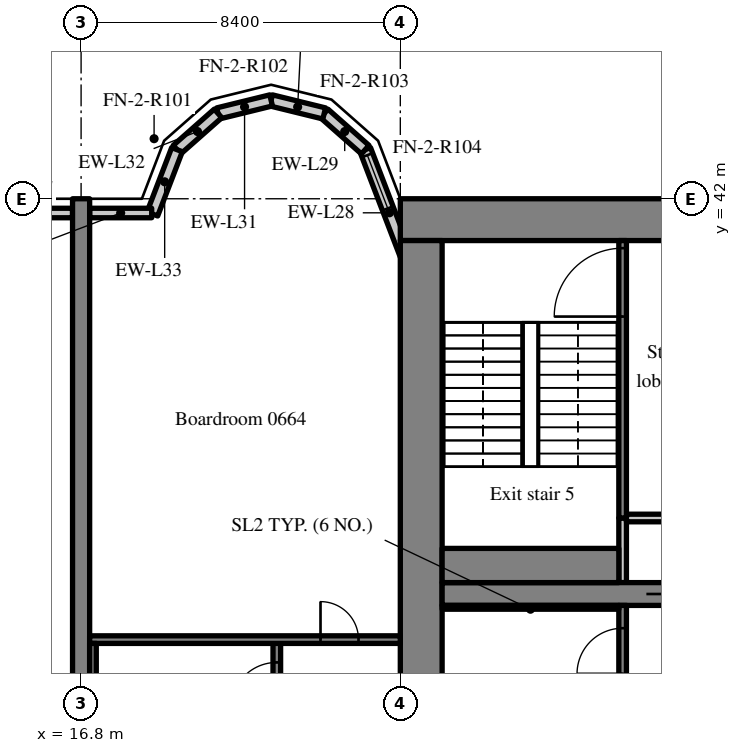
"""IFC4 building model, lengths in metres.
Left out: names, types, materials, properties, quantities, classifications, styles, units other than length and angle.
Written with IfcOpenShell. Run it as: python <this file> out.ifc"""

import sys

from ifc_helpers import new_model, si_unit, direction, frame, frame_2d, origin, place, context, subcontext, project, spatial, rectangle, extrude, source, transform, mapped, element, fill, save


model = new_model("IFC4")
c1 = context("Model", 3, precision=1e-05, world=origin(), true_north=direction((0.0, 1.0)))
c2 = subcontext(c1, "Body", "Model", "MODEL_VIEW")
j1 = project(units=[si_unit("LENGTHUNIT", "METRE"), si_unit("PLANEANGLEUNIT", "RADIAN")], contexts=[c1])
p1 = place(None, origin())
s1 = spatial("IfcSite", under=j1, at=p1, CompositionType="ELEMENT")
p2 = place(p1, origin())
s2 = spatial("IfcBuilding", under=s1, at=p2, CompositionType="ELEMENT")
p3 = place(p2, frame((0.0, 0.0, 31.6)))
s3 = spatial("IfcBuildingStorey", under=s2, at=p3, CompositionType="ELEMENT", Elevation=31.6)
m1 = source(origin(), c2, "Body", "SweptSolid", [
    extrude(rectangle(XDim=50.4, YDim=1.1, at=frame_2d((25.2, 0.0))), origin(), (0.0, 0.0, 1.0), 3.52),
])
p4 = place(p3, frame((25.2, 41.45, 0.0), z_axis=(0.0, 0.0, 1.0), x_axis=(1.0, 0.0, 0.0)))
e1 = element("IfcWall", 1, at=p4, inside=s3, PredefinedType="SHEAR", context=c2, shape_type="MappedRepresentation", body=[
    mapped(m1, transform((0.0, 0.0, 0.0), scale=1.0)),
])
m2 = source(origin(), c2, "Body", "SweptSolid", [
    extrude(rectangle(XDim=17.8, YDim=1.1, at=frame_2d((8.9, 0.0))), origin(), (0.0, 0.0, 1.0), 3.52),
])
p5 = place(p3, frame((25.75, 23.1, 0.0), z_axis=(0.0, 0.0, 1.0), x_axis=(0.0, 1.0, 0.0)))
e2 = element("IfcWall", 2, at=p5, inside=s3, PredefinedType="SHEAR", context=c2, shape_type="MappedRepresentation", body=[
    mapped(m2, transform((0.0, 0.0, 0.0), scale=1.0)),
])
m3 = source(origin(), c2, "Body", "SweptSolid", [
    extrude(rectangle(XDim=7.0, YDim=0.6, at=frame_2d((3.5, 0.0))), origin(), (0.0, 0.0, 1.0), 3.52),
])
p6 = place(p3, frame((26.3, 31.6, 0.0), z_axis=(0.0, 0.0, 1.0), x_axis=(1.0, 0.0, 0.0)))
e3 = element("IfcWall", 3, at=p6, inside=s3, PredefinedType="SHEAR", context=c2, shape_type="MappedRepresentation", body=[
    mapped(m3, transform((0.0, 0.0, 0.0), scale=1.0)),
])
m4 = source(origin(), c2, "Body", "SweptSolid", [
    extrude(rectangle(XDim=1.1, YDim=2.1, at=frame_2d((0.55, 1.05))), frame((0.0, 0.31, 0.0), z_axis=(0.0, -1.0, 0.0), x_axis=(1.0, 0.0, 0.0)), (0.0, 0.0, 1.0), 0.62),
])
p7 = place(p6, frame((5.375, 0.0, 0.0)))
e4 = element("IfcOpeningElement", 4, at=p7, cuts=e3, PredefinedType="OPENING", context=c2, shape_type="MappedRepresentation", body=[
    mapped(m4, transform((0.0, 0.0, 0.0), scale=1.0)),
])
m5 = source(origin(), c2, "Body", "SweptSolid", [
    extrude(rectangle(XDim=20.0, YDim=0.45, at=frame_2d((10.0, 0.0))), origin(), (0.0, 0.0, 1.0), 3.52),
])
p8 = place(p3, frame((16.8, 22.0, 0.0), z_axis=(0.0, 0.0, 1.0), x_axis=(0.0, 1.0, 0.0)))
e5 = element("IfcWall", 5, at=p8, inside=s3, PredefinedType="SHEAR", context=c2, shape_type="MappedRepresentation", body=[
    mapped(m5, transform((0.0, 0.0, 0.0), scale=1.0)),
])
m6 = source(origin(), c2, "Body", "SweptSolid", [
    extrude(rectangle(XDim=3.559, YDim=0.3, at=frame_2d((1.78, 0.0))), origin(), (0.0, 0.0, 1.0), 3.52),
])
p9 = place(p3, frame((25.55, 39.969, 0.0), z_axis=(0.0, 0.0, 1.0), x_axis=(-0.35779745313, 0.933799219604, 0.0)))
e6 = element("IfcWall", 6, at=p9, inside=s3, PredefinedType="SOLIDWALL", context=c2, shape_type="MappedRepresentation", body=[
    mapped(m6, transform((0.0, 0.0, 0.0), scale=1.0)),
])
m7 = source(origin(), c2, "Body", "SweptSolid", [
    extrude(rectangle(XDim=1.5, YDim=2.0, at=frame_2d((0.75, 1.0))), frame((0.0, 0.16, 0.0), z_axis=(0.0, -1.0, 0.0), x_axis=(1.0, 0.0, 0.0)), (0.0, 0.0, 1.0), 0.32),
])
p10 = place(p9, frame((1.903, 0.0, 0.9)))
e7 = element("IfcOpeningElement", 7, at=p10, cuts=e6, PredefinedType="OPENING", context=c2, shape_type="MappedRepresentation", body=[
    mapped(m7, transform((0.0, 0.0, 0.0), scale=1.0)),
])
m8 = source(origin(), c2, "Body", "SweptSolid", [
    extrude(rectangle(XDim=1.44, YDim=0.3, at=frame_2d((0.72, 0.0))), origin(), (0.0, 0.0, 1.0), 3.52),
])
p11 = place(p3, frame((24.277, 43.292, 0.0), z_axis=(0.0, 0.0, 1.0), x_axis=(-0.749649827867, 0.661834673902, 0.0)))
e8 = element("IfcWall", 8, at=p11, inside=s3, PredefinedType="SOLIDWALL", context=c2, shape_type="MappedRepresentation", body=[
    mapped(m8, transform((0.0, 0.0, 0.0), scale=1.0)),
])
m9 = source(origin(), c2, "Body", "SweptSolid", [
    extrude(rectangle(XDim=1.438, YDim=0.3, at=frame_2d((0.719, 0.0))), origin(), (0.0, 0.0, 1.0), 3.52),
])
p12 = place(p3, frame((23.197, 44.245, 0.0), z_axis=(0.0, 0.0, 1.0), x_axis=(-0.971152283879, 0.238460146601, 0.0)))
e9 = element("IfcWall", 9, at=p12, inside=s3, PredefinedType="SOLIDWALL", context=c2, shape_type="MappedRepresentation", body=[
    mapped(m9, transform((0.0, 0.0, 0.0), scale=1.0)),
])
m10 = source(origin(), c2, "Body", "SweptSolid", [
    extrude(rectangle(XDim=1.439, YDim=0.3, at=frame_2d((0.719, 0.0))), origin(), (0.0, 0.0, 1.0), 3.52),
])
p13 = place(p3, frame((21.8, 44.588, 0.0), z_axis=(0.0, 0.0, 1.0), x_axis=(-0.971161932466, -0.238420848351, 0.0)))
e10 = element("IfcWall", 10, at=p13, inside=s3, PredefinedType="SOLIDWALL", context=c2, shape_type="MappedRepresentation", body=[
    mapped(m10, transform((0.0, 0.0, 0.0), scale=1.0)),
])
m11 = source(origin(), c2, "Body", "SweptSolid", [
    extrude(rectangle(XDim=1.44, YDim=0.3, at=frame_2d((0.72, 0.0))), origin(), (0.0, 0.0, 1.0), 3.52),
])
p14 = place(p3, frame((20.403, 44.245, 0.0), z_axis=(0.0, 0.0, 1.0), x_axis=(-0.74957555648, -0.661918790432, 0.0)))
e11 = element("IfcWall", 11, at=p14, inside=s3, PredefinedType="SOLIDWALL", context=c2, shape_type="MappedRepresentation", body=[
    mapped(m11, transform((0.0, 0.0, 0.0), scale=1.0)),
])
m12 = source(origin(), c2, "Body", "SweptSolid", [
    extrude(rectangle(XDim=1.812, YDim=0.3, at=frame_2d((0.906, 0.0))), origin(), (0.0, 0.0, 1.0), 3.52),
])
p15 = place(p3, frame((19.323, 43.292, 0.0), z_axis=(0.0, 0.0, 1.0), x_axis=(-0.357877270961, -0.93376863244, 0.0)))
e12 = element("IfcWall", 12, at=p15, inside=s3, PredefinedType="SOLIDWALL", context=c2, shape_type="MappedRepresentation", body=[
    mapped(m12, transform((0.0, 0.0, 0.0), scale=1.0)),
])
m13 = source(origin(), c2, "Body", "SweptSolid", [
    extrude(rectangle(XDim=3.525, YDim=0.25, at=frame_2d((1.762, 0.0))), origin(), (0.0, 0.0, 1.0), 2.77),
])
p16 = place(p3, frame((16.575, 41.625, 0.0), z_axis=(0.0, 0.0, 1.0), x_axis=(-1.0, 0.0, 0.0)))
e13 = element("IfcWall", 13, at=p16, inside=s3, PredefinedType="SOLIDWALL", context=c2, shape_type="MappedRepresentation", body=[
    mapped(m13, transform((0.0, 0.0, 0.0), scale=1.0)),
])
m14 = source(origin(), c2, "Body", "SweptSolid", [
    extrude(rectangle(XDim=1.5, YDim=1.5, at=frame_2d((0.75, 0.75))), frame((0.0, 0.135, 0.0), z_axis=(0.0, -1.0, 0.0), x_axis=(1.0, 0.0, 0.0)), (0.0, 0.0, 1.0), 0.27),
])
p17 = place(p16, frame((1.012, 0.0, 0.9)))
e14 = element("IfcOpeningElement", 14, at=p17, cuts=e13, PredefinedType="OPENING", context=c2, shape_type="MappedRepresentation", body=[
    mapped(m14, transform((0.0, 0.0, 0.0), scale=1.0)),
])
m15 = source(origin(), c2, "Body", "SweptSolid", [
    extrude(rectangle(XDim=1.633, YDim=0.25, at=frame_2d((0.816, 0.0))), origin(), (0.0, 0.0, 1.0), 2.77),
])
p18 = place(p3, frame((18.658, 41.625, 0.0), z_axis=(0.0, 0.0, 1.0), x_axis=(-1.0, 0.0, 0.0)))
e15 = element("IfcWall", 15, at=p18, inside=s3, PredefinedType="SOLIDWALL", context=c2, shape_type="MappedRepresentation", body=[
    mapped(m15, transform((0.0, 0.0, 0.0), scale=1.0)),
])
m16 = source(origin(), c2, "Body", "SweptSolid", [
    extrude(rectangle(XDim=8.2, YDim=0.2, at=frame_2d((4.1, 0.0))), origin(), (0.0, 0.0, 1.0), 3.52),
])
p19 = place(p3, frame((31.05, 23.1, 0.0), z_axis=(0.0, 0.0, 1.0), x_axis=(0.0, 1.0, 0.0)))
e16 = element("IfcWall", 16, at=p19, inside=s3, PredefinedType="SOLIDWALL", context=c2, shape_type="MappedRepresentation", body=[
    mapped(m16, transform((0.0, 0.0, 0.0), scale=1.0)),
])
m17 = source(origin(), c2, "Body", "SweptSolid", [
    extrude(rectangle(XDim=1.2, YDim=2.1, at=frame_2d((0.6, 1.05))), frame((0.0, 0.11, 0.0), z_axis=(0.0, -1.0, 0.0), x_axis=(1.0, 0.0, 0.0)), (0.0, 0.0, 1.0), 0.22),
])
p20 = place(p19, frame((6.4, 0.0, 0.0)))
e17 = element("IfcOpeningElement", 17, at=p20, cuts=e16, PredefinedType="OPENING", context=c2, shape_type="MappedRepresentation", body=[
    mapped(m17, transform((0.0, 0.0, 0.0), scale=1.0)),
])
m18 = source(origin(), c2, "Body", "SweptSolid", [
    extrude(rectangle(XDim=1.7, YDim=0.2, at=frame_2d((0.85, 0.0))), origin(), (0.0, 0.0, 1.0), 3.52),
])
p21 = place(p3, frame((31.05, 31.9, 0.0), z_axis=(0.0, 0.0, 1.0), x_axis=(0.0, 1.0, 0.0)))
e18 = element("IfcWall", 18, at=p21, inside=s3, PredefinedType="SOLIDWALL", context=c2, shape_type="MappedRepresentation", body=[
    mapped(m18, transform((0.0, 0.0, 0.0), scale=1.0)),
])
m19 = source(origin(), c2, "Body", "SweptSolid", [
    extrude(rectangle(XDim=2.15, YDim=0.2, at=frame_2d((1.075, 0.0))), origin(), (0.0, 0.0, 1.0), 3.52),
])
p22 = place(p3, frame((31.15, 33.6, 0.0), z_axis=(0.0, 0.0, 1.0), x_axis=(1.0, 0.0, 0.0)))
e19 = element("IfcWall", 19, at=p22, inside=s3, PredefinedType="SOLIDWALL", context=c2, shape_type="MappedRepresentation", body=[
    mapped(m19, transform((0.0, 0.0, 0.0), scale=1.0)),
])
m20 = source(origin(), c2, "Body", "SweptSolid", [
    extrude(rectangle(XDim=7.3, YDim=0.2, at=frame_2d((3.65, 0.0))), origin(), (0.0, 0.0, 1.0), 3.52),
])
p23 = place(p3, frame((31.05, 33.6, 0.0), z_axis=(0.0, 0.0, 1.0), x_axis=(0.0, 1.0, 0.0)))
e20 = element("IfcWall", 20, at=p23, inside=s3, PredefinedType="SOLIDWALL", context=c2, shape_type="MappedRepresentation", body=[
    mapped(m20, transform((0.0, 0.0, 0.0), scale=1.0)),
])
m21 = source(origin(), c2, "Body", "SweptSolid", [
    extrude(rectangle(XDim=1.8, YDim=2.1, at=frame_2d((0.9, 1.05))), frame((0.0, 0.11, 0.0), z_axis=(0.0, -1.0, 0.0), x_axis=(1.0, 0.0, 0.0)), (0.0, 0.0, 1.0), 0.22),
])
p24 = place(p23, frame((5.3, 0.0, 0.0)))
e21 = element("IfcOpeningElement", 21, at=p24, cuts=e20, PredefinedType="OPENING", context=c2, shape_type="MappedRepresentation", body=[
    mapped(m21, transform((0.0, 0.0, 0.0), scale=1.0)),
])
m22 = source(origin(), c2, "Body", "SweptSolid", [
    extrude(rectangle(XDim=8.3, YDim=0.2, at=frame_2d((4.15, 0.0))), origin(), (0.0, 0.0, 1.0), 3.52),
])
p25 = place(p3, frame((21.95, 22.1, 0.0), z_axis=(0.0, 0.0, 1.0), x_axis=(0.0, 1.0, 0.0)))
e22 = element("IfcWall", 22, at=p25, inside=s3, PredefinedType="SOLIDWALL", context=c2, shape_type="MappedRepresentation", body=[
    mapped(m22, transform((0.0, 0.0, 0.0), scale=1.0)),
])
p26 = place(p25, frame((6.5, 0.0, 0.0)))
e23 = element("IfcOpeningElement", 23, at=p26, cuts=e22, PredefinedType="OPENING", context=c2, shape_type="MappedRepresentation", body=[
    mapped(m17, transform((0.0, 0.0, 0.0), scale=1.0)),
])
m23 = source(origin(), c2, "Body", "SweptSolid", [
    extrude(rectangle(XDim=8.175, YDim=0.2, at=frame_2d((4.087, 0.0))), origin(), (0.0, 0.0, 1.0), 3.52),
])
p27 = place(p3, frame((17.025, 30.4, 0.0), z_axis=(0.0, 0.0, 1.0), x_axis=(1.0, 0.0, 0.0)))
e24 = element("IfcWall", 24, at=p27, inside=s3, PredefinedType="SOLIDWALL", context=c2, shape_type="MappedRepresentation", body=[
    mapped(m23, transform((0.0, 0.0, 0.0), scale=1.0)),
])
m24 = source(origin(), c2, "Body", "SweptSolid", [
    extrude(rectangle(XDim=1.0, YDim=2.1, at=frame_2d((0.5, 1.05))), frame((0.0, 0.11, 0.0), z_axis=(0.0, -1.0, 0.0), x_axis=(1.0, 0.0, 0.0)), (0.0, 0.0, 1.0), 0.22),
])
p28 = place(p27, frame((6.075, 0.0, 0.0)))
e25 = element("IfcOpeningElement", 25, at=p28, cuts=e24, PredefinedType="OPENING", context=c2, shape_type="MappedRepresentation", body=[
    mapped(m24, transform((0.0, 0.0, 0.0), scale=1.0)),
])
m25 = source(origin(), c2, "Body", "SweptSolid", [
    extrude(rectangle(XDim=4.65, YDim=0.1, at=frame_2d((2.325, 0.0))), origin(), (0.0, 0.0, 1.0), 3.52),
])
p29 = place(p3, frame((26.3, 31.25, 0.0), z_axis=(0.0, 0.0, 1.0), x_axis=(1.0, 0.0, 0.0)))
e26 = element("IfcWall", 26, at=p29, inside=s3, PredefinedType="SOLIDWALL", context=c2, shape_type="MappedRepresentation", body=[
    mapped(m25, transform((0.0, 0.0, 0.0), scale=1.0)),
])
m26 = source(origin(), c2, "Body", "SweptSolid", [
    extrude(rectangle(XDim=8.1, YDim=0.175, at=frame_2d((4.05, 0.0))), origin(), (0.0, 0.0, 1.0), 3.52),
])
p30 = place(p3, frame((17.112, 22.2, 0.0), z_axis=(0.0, 0.0, 1.0), x_axis=(0.0, 1.0, 0.0)))
e27 = element("IfcWall", 27, at=p30, inside=s3, PredefinedType="SOLIDWALL", context=c2, shape_type="MappedRepresentation", body=[
    mapped(m26, transform((0.0, 0.0, 0.0), scale=1.0)),
])
m27 = source(origin(), c2, "Body", "SweptSolid", [
    extrude(rectangle(XDim=4.65, YDim=0.9, at=frame_2d((2.325, 0.0))), origin(), (0.0, 0.0, 1.0), 3.52),
])
p31 = place(p3, frame((26.3, 32.35, 0.0), z_axis=(0.0, 0.0, 1.0), x_axis=(1.0, 0.0, 0.0)))
e28 = element("IfcWall", 28, at=p31, inside=s3, PredefinedType="SOLIDWALL", context=c2, shape_type="MappedRepresentation", body=[
    mapped(m27, transform((0.0, 0.0, 0.0), scale=1.0)),
])
m28 = source(origin(), c2, "Body", "SweptSolid", [
    extrude(rectangle(XDim=1.5, YDim=2.0, at=frame_2d((0.75, 1.0))), frame((0.0, 0.03, 0.0), z_axis=(0.0, -1.0, 0.0), x_axis=(1.0, 0.0, 0.0)), (0.0, 0.0, 1.0), 0.06),
])
p32 = place(p10, origin())
e29 = element("IfcWindow", 29, at=p32, inside=s3, PartitioningType="SINGLE_PANEL", PredefinedType="WINDOW", context=c2, shape_type="MappedRepresentation", body=[
    mapped(m28, transform((0.0, 0.0, 0.0), scale=1.0)),
])
fill(e7, e29)
m29 = source(origin(), c2, "Body", "SweptSolid", [
    extrude(rectangle(XDim=1.2, YDim=2.1, at=frame_2d((0.6, 1.05))), frame((0.0, 0.025, 0.0), z_axis=(0.0, -1.0, 0.0), x_axis=(1.0, 0.0, 0.0)), (0.0, 0.0, 1.0), 0.05),
])
p33 = place(p20, origin())
e30 = element("IfcDoor", 30, at=p33, inside=s3, OperationType="SINGLE_SWING_LEFT", PredefinedType="DOOR", context=c2, shape_type="MappedRepresentation", body=[
    mapped(m29, transform((0.0, 0.0, 0.0), scale=1.0)),
])
fill(e17, e30)
m30 = source(origin(), c2, "Body", "SweptSolid", [
    extrude(rectangle(XDim=1.1, YDim=2.1, at=frame_2d((0.55, 1.05))), frame((0.0, 0.025, 0.0), z_axis=(0.0, -1.0, 0.0), x_axis=(1.0, 0.0, 0.0)), (0.0, 0.0, 1.0), 0.05),
])
p34 = place(p7, origin())
e31 = element("IfcDoor", 31, at=p34, inside=s3, OperationType="SLIDING_TO_RIGHT", PredefinedType="DOOR", context=c2, shape_type="MappedRepresentation", body=[
    mapped(m30, transform((0.0, 0.0, 0.0), scale=1.0)),
])
fill(e4, e31)
m31 = source(origin(), c2, "Body", "SweptSolid", [
    extrude(rectangle(XDim=1.8, YDim=2.1, at=frame_2d((0.9, 1.05))), frame((0.0, 0.025, 0.0), z_axis=(0.0, -1.0, 0.0), x_axis=(1.0, 0.0, 0.0)), (0.0, 0.0, 1.0), 0.05),
])
p35 = place(p24, origin())
e32 = element("IfcDoor", 32, at=p35, inside=s3, OperationType="SINGLE_SWING_LEFT", PredefinedType="DOOR", context=c2, shape_type="MappedRepresentation", body=[
    mapped(m31, transform((0.0, 0.0, 0.0), scale=1.0)),
])
fill(e21, e32)
p36 = place(p26, origin())
e33 = element("IfcDoor", 33, at=p36, inside=s3, OperationType="SINGLE_SWING_LEFT", PredefinedType="DOOR", context=c2, shape_type="MappedRepresentation", body=[
    mapped(m29, transform((0.0, 0.0, 0.0), scale=1.0)),
])
fill(e23, e33)
m32 = source(origin(), c2, "Body", "SweptSolid", [
    extrude(rectangle(XDim=1.0, YDim=2.1, at=frame_2d((0.5, 1.05))), frame((0.0, 0.025, 0.0), z_axis=(0.0, -1.0, 0.0), x_axis=(1.0, 0.0, 0.0)), (0.0, 0.0, 1.0), 0.05),
])
p37 = place(p28, origin())
e34 = element("IfcDoor", 34, at=p37, inside=s3, OperationType="SINGLE_SWING_LEFT", PredefinedType="DOOR", context=c2, shape_type="MappedRepresentation", body=[
    mapped(m32, transform((0.0, 0.0, 0.0), scale=1.0)),
])
fill(e25, e34)
save(model, sys.argv[1])
